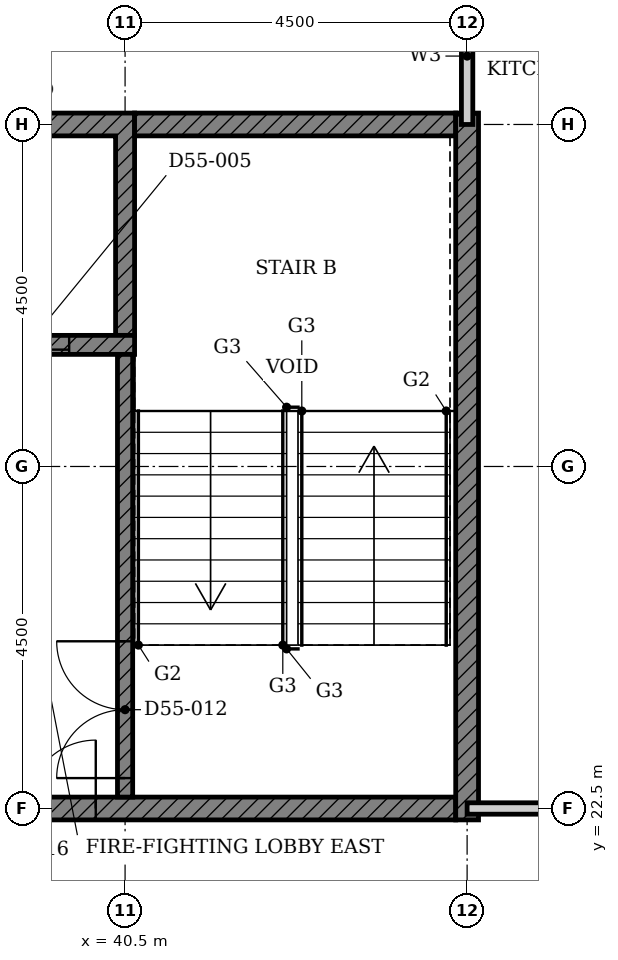
"""IFC4 building model, lengths in metres.
Left out: names, types, materials, properties, quantities, classifications, styles, units other than length and angle.
Written with IfcOpenShell. Run it as: python <this file> out.ifc"""

import sys

from ifc_helpers import new_model, si_unit, direction, frame, frame_2d, origin, place, context, subcontext, project, spatial, polyline, rectangle, outline, extrude, element, fill, save


model = new_model("IFC4")
c1 = context("Model", 3, precision=1e-05, world=origin(), true_north=direction((0.0, 1.0)))
c2 = subcontext(c1, "Body", "Model", "MODEL_VIEW")
j1 = project(units=[si_unit("LENGTHUNIT", "METRE"), si_unit("PLANEANGLEUNIT", "RADIAN")], contexts=[c1])
p1 = place(None, origin())
s1 = spatial("IfcSite", under=j1, at=p1, CompositionType="ELEMENT")
p2 = place(p1, origin())
s2 = spatial("IfcBuilding", under=s1, at=p2, CompositionType="ELEMENT")
p3 = place(p2, frame((0.0, 0.0, 218.3)))
s3 = spatial("IfcBuildingStorey", under=s2, at=p3, CompositionType="ELEMENT", Elevation=218.3)
p4 = place(p3, origin())
e1 = element("IfcWall", 1, at=p4, inside=s3, PredefinedType="SHEAR", context=c2, shape_type="SweptSolid", body=[
    extrude(outline(polyline([(35.232, 28.725), (35.482, 28.725), (35.482, 31.35), (37.803, 31.35), (37.803, 28.725), (38.053, 28.725), (38.053, 31.35), (40.375, 31.35), (40.375, 28.725), (40.625, 28.725), (40.625, 31.65), (35.232, 31.65), (35.232, 28.725)])), origin(), (0.0, 0.0, 1.0), 3.4),
])
p5 = place(p3, frame((32.911, 22.5, 0.0), z_axis=(0.0, 0.0, 1.0), x_axis=(1.0, 0.0, 0.0)))
e2 = element("IfcWall", 2, at=p5, inside=s3, PredefinedType="SHEAR", context=c2, shape_type="SweptSolid", body=[
    extrude(rectangle(XDim=11.939, YDim=0.3, at=frame_2d((5.97, 0.0))), origin(), (0.0, 0.0, 1.0), 3.4),
])
p6 = place(p5, frame((5.404, 0.0, 0.0)))
e3 = element("IfcOpeningElement", 3, at=p6, cuts=e2, PredefinedType="OPENING", context=c2, shape_type="SweptSolid", body=[
    extrude(rectangle(XDim=1.8, YDim=2.1, at=frame_2d((0.9, 1.05))), frame((0.0, 0.16, 0.0), z_axis=(0.0, -1.0, 0.0), x_axis=(1.0, 0.0, 0.0)), (0.0, 0.0, 1.0), 0.32),
])
p7 = place(p3, frame((40.625, 31.5, 0.0), z_axis=(0.0, 0.0, 1.0), x_axis=(1.0, 0.0, 0.0)))
e4 = element("IfcWall", 4, at=p7, inside=s3, PredefinedType="SHEAR", context=c2, shape_type="SweptSolid", body=[
    extrude(rectangle(XDim=4.225, YDim=0.3, at=frame_2d((2.113, 0.0))), origin(), (0.0, 0.0, 1.0), 3.4),
])
p8 = place(p3, frame((45.0, 22.35, 0.0), z_axis=(0.0, 0.0, 1.0), x_axis=(0.0, 1.0, 0.0)))
e5 = element("IfcWall", 5, at=p8, inside=s3, PredefinedType="SHEAR", context=c2, shape_type="SweptSolid", body=[
    extrude(rectangle(XDim=9.3, YDim=0.3, at=frame_2d((4.65, 0.0))), origin(), (0.0, 0.0, 1.0), 3.4),
])
p9 = place(p3, frame((24.947, 28.6, 0.0), z_axis=(0.0, 0.0, 1.0), x_axis=(1.0, 0.0, 0.0)))
e6 = element("IfcWall", 6, at=p9, inside=s3, PredefinedType="SHEAR", context=c2, shape_type="SweptSolid", body=[
    extrude(rectangle(XDim=15.678, YDim=0.25, at=frame_2d((7.839, 0.0))), origin(), (0.0, 0.0, 1.0), 3.4),
])
p10 = place(p9, frame((6.004, 0.0, 0.0)))
e7 = element("IfcOpeningElement", 7, at=p10, cuts=e6, PredefinedType="OPENING", context=c2, shape_type="SweptSolid", body=[
    extrude(rectangle(XDim=1.1, YDim=2.1, at=frame_2d((0.55, 1.05))), frame((0.0, 0.135, 0.0), z_axis=(0.0, -1.0, 0.0), x_axis=(1.0, 0.0, 0.0)), (0.0, 0.0, 1.0), 0.27),
])
p11 = place(p9, frame((11.146, 0.0, 0.0)))
e8 = element("IfcOpeningElement", 8, at=p11, cuts=e6, PredefinedType="OPENING", context=c2, shape_type="SweptSolid", body=[
    extrude(rectangle(XDim=1.1, YDim=2.1, at=frame_2d((0.55, 1.05))), frame((0.0, 0.135, 0.0), z_axis=(0.0, -1.0, 0.0), x_axis=(1.0, 0.0, 0.0)), (0.0, 0.0, 1.0), 0.27),
])
p12 = place(p9, frame((13.718, 0.0, 0.0)))
e9 = element("IfcOpeningElement", 9, at=p12, cuts=e6, PredefinedType="OPENING", context=c2, shape_type="SweptSolid", body=[
    extrude(rectangle(XDim=1.1, YDim=2.1, at=frame_2d((0.55, 1.05))), frame((0.0, 0.135, 0.0), z_axis=(0.0, -1.0, 0.0), x_axis=(1.0, 0.0, 0.0)), (0.0, 0.0, 1.0), 0.27),
])
p13 = place(p9, frame((0.961, 0.0, 0.0)))
e10 = element("IfcOpeningElement", 10, at=p13, cuts=e6, PredefinedType="OPENING", context=c2, shape_type="SweptSolid", body=[
    extrude(rectangle(XDim=0.9, YDim=2.1, at=frame_2d((0.45, 1.05))), frame((0.0, 0.135, 0.0), z_axis=(0.0, -1.0, 0.0), x_axis=(1.0, 0.0, 0.0)), (0.0, 0.0, 1.0), 0.27),
])
p14 = place(p9, frame((8.675, 0.0, 0.0)))
e11 = element("IfcOpeningElement", 11, at=p14, cuts=e6, PredefinedType="OPENING", context=c2, shape_type="SweptSolid", body=[
    extrude(rectangle(XDim=0.9, YDim=2.1, at=frame_2d((0.45, 1.05))), frame((0.0, 0.135, 0.0), z_axis=(0.0, -1.0, 0.0), x_axis=(1.0, 0.0, 0.0)), (0.0, 0.0, 1.0), 0.27),
])
p15 = place(p3, frame((40.5, 22.65, 0.0), z_axis=(0.0, 0.0, 1.0), x_axis=(0.0, 1.0, 0.0)))
e12 = element("IfcWall", 12, at=p15, inside=s3, PredefinedType="SHEAR", context=c2, shape_type="SweptSolid", body=[
    extrude(rectangle(XDim=5.825, YDim=0.2, at=frame_2d((2.913, 0.0))), origin(), (0.0, 0.0, 1.0), 3.4),
])
p16 = place(p15, frame((0.25, 0.0, 0.0)))
e13 = element("IfcOpeningElement", 13, at=p16, cuts=e12, PredefinedType="OPENING", context=c2, shape_type="SweptSolid", body=[
    extrude(rectangle(XDim=1.8, YDim=2.1, at=frame_2d((0.9, 1.05))), frame((0.0, 0.11, 0.0), z_axis=(0.0, -1.0, 0.0), x_axis=(1.0, 0.0, 0.0)), (0.0, 0.0, 1.0), 0.22),
])
p17 = place(p3, frame((45.0, 22.5, 0.0), z_axis=(0.0, 0.0, 1.0), x_axis=(1.0, 0.0, 0.0)))
e14 = element("IfcWall", 14, at=p17, inside=s3, PredefinedType="PARTITIONING", context=c2, shape_type="SweptSolid", body=[
    extrude(rectangle(XDim=4.765, YDim=0.15, at=frame_2d((2.382, 0.0))), origin(), (0.0, 0.0, 1.0), 3.4),
])
p18 = place(p17, frame((1.75, 0.0, 0.0)))
e15 = element("IfcOpeningElement", 15, at=p18, cuts=e14, PredefinedType="OPENING", context=c2, shape_type="SweptSolid", body=[
    extrude(rectangle(XDim=1.0, YDim=2.2, at=frame_2d((0.5, 1.1))), frame((0.0, 0.085, 0.0), z_axis=(0.0, -1.0, 0.0), x_axis=(1.0, 0.0, 0.0)), (0.0, 0.0, 1.0), 0.17),
])
p19 = place(p3, frame((45.0, 31.5, 0.0), z_axis=(0.0, 0.0, 1.0), x_axis=(0.0, 1.0, 0.0)))
e16 = element("IfcWall", 16, at=p19, inside=s3, PredefinedType="PARTITIONING", context=c2, shape_type="SweptSolid", body=[
    extrude(rectangle(XDim=1.8, YDim=0.15, at=frame_2d((0.9, 0.0))), origin(), (0.0, 0.0, 1.0), 3.4),
])
p20 = place(p12, origin())
e17 = element("IfcDoor", 17, at=p20, inside=s3, OperationType="DOUBLE_DOOR_SLIDING", PredefinedType="DOOR", context=c2, shape_type="SweptSolid", body=[
    extrude(rectangle(XDim=1.1, YDim=2.1, at=frame_2d((0.55, 1.05))), frame((0.0, 0.025, 0.0), z_axis=(0.0, -1.0, 0.0), x_axis=(1.0, 0.0, 0.0)), (0.0, 0.0, 1.0), 0.05),
])
fill(e9, e17)
p21 = place(p16, origin())
e18 = element("IfcDoor", 18, at=p21, inside=s3, OperationType="DOUBLE_DOOR_SINGLE_SWING", PredefinedType="DOOR", context=c2, shape_type="SweptSolid", body=[
    extrude(rectangle(XDim=1.8, YDim=2.1, at=frame_2d((0.9, 1.05))), frame((0.0, 0.025, 0.0), z_axis=(0.0, -1.0, 0.0), x_axis=(1.0, 0.0, 0.0)), (0.0, 0.0, 1.0), 0.05),
])
fill(e13, e18)
p22 = place(p6, origin())
e19 = element("IfcDoor", 19, at=p22, inside=s3, OperationType="DOUBLE_DOOR_SINGLE_SWING", PredefinedType="DOOR", context=c2, shape_type="SweptSolid", body=[
    extrude(rectangle(XDim=1.8, YDim=2.1, at=frame_2d((0.9, 1.05))), frame((0.0, 0.025, 0.0), z_axis=(0.0, -1.0, 0.0), x_axis=(1.0, 0.0, 0.0)), (0.0, 0.0, 1.0), 0.05),
])
fill(e3, e19)
save(model, sys.argv[1])
